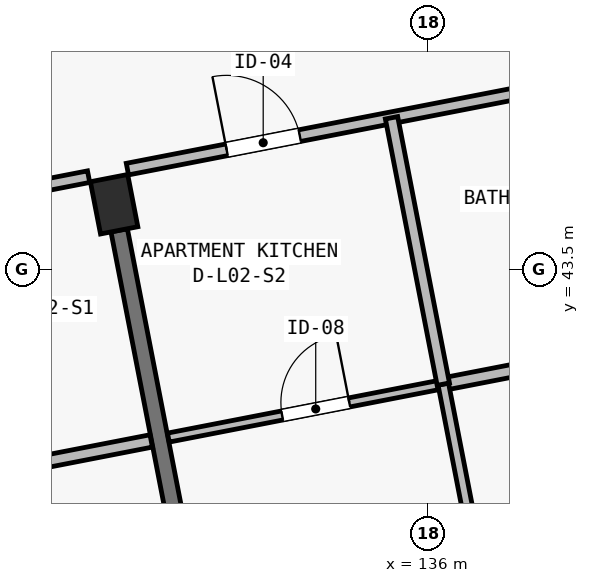
"""IFC4 building model, lengths in metres.
Left out: names, types, materials, properties, quantities, classifications, styles, units other than length and angle.
Written with IfcOpenShell. Run it as: python <this file> out.ifc"""

import sys

from ifc_helpers import new_model, si_unit, direction, frame, frame_2d, origin, origin_2d, place, context, subcontext, project, spatial, rectangle, extrude, element, fill, save


model = new_model("IFC4")
c1 = context("Model", 3, precision=1e-05, world=origin(), true_north=direction((0.0, 1.0)))
c2 = subcontext(c1, "Body", "Model", "MODEL_VIEW")
j1 = project(units=[si_unit("LENGTHUNIT", "METRE"), si_unit("PLANEANGLEUNIT", "RADIAN")], contexts=[c1])
p1 = place(None, origin())
s1 = spatial("IfcSite", under=j1, at=p1, CompositionType="ELEMENT")
p2 = place(p1, origin())
s2 = spatial("IfcBuilding", under=s1, at=p2, CompositionType="ELEMENT")
p3 = place(p2, frame((0.0, 0.0, 8.4)))
s3 = spatial("IfcBuildingStorey", under=s2, at=p3, CompositionType="ELEMENT", Elevation=8.4)
p4 = place(p3, frame((131.871, 44.361, 0.0), z_axis=(0.0, 0.0, 1.0), x_axis=(0.981627183448, 0.190808995377, 0.0)))
e1 = element("IfcColumn", 1, at=p4, inside=s3, PredefinedType="COLUMN", context=c2, shape_type="SweptSolid", body=[
    extrude(rectangle(XDim=0.5, YDim=0.7, at=origin_2d()), origin(), (0.0, 0.0, 1.0), 3.25),
])
p5 = place(p3, frame((133.254, 37.244, 0.0), z_axis=(0.0, 0.0, 1.0), x_axis=(-0.190819465253, 0.981625148252, 0.0)))
e2 = element("IfcWall", 2, at=p5, inside=s3, PredefinedType="SHEAR", context=c2, shape_type="SweptSolid", body=[
    extrude(rectangle(XDim=6.9, YDim=0.22, at=frame_2d((3.45, 0.0))), origin(), (0.0, 0.0, 1.0), 2.5),
])
p6 = place(p3, frame((124.585, 43.372, 0.0), z_axis=(0.0, 0.0, 1.0), x_axis=(0.9816234647, 0.190828125677, 0.0)))
e3 = element("IfcWall", 3, at=p6, inside=s3, PredefinedType="PARTITIONING", context=c2, shape_type="SweptSolid", body=[
    extrude(rectangle(XDim=7.08, YDim=0.155, at=frame_2d((3.54, 0.0))), origin(), (0.0, 0.0, 1.0), 2.97),
])
p7 = place(p6, frame((1.33, 0.0, 0.0)))
e4 = element("IfcOpeningElement", 4, at=p7, cuts=e3, PredefinedType="OPENING", context=c2, shape_type="SweptSolid", body=[
    extrude(rectangle(XDim=1.02, YDim=2.2, at=frame_2d((0.51, 1.1))), frame((0.0, 0.093, 0.0), z_axis=(0.0, -1.0, 0.0), x_axis=(1.0, 0.0, 0.0)), (0.0, 0.0, 1.0), 0.185),
])
p8 = place(p3, frame((128.741, 40.543, 0.0), z_axis=(0.0, 0.0, 1.0), x_axis=(0.981626422232, 0.190812911449, 0.0)))
e5 = element("IfcWall", 5, at=p8, inside=s3, PredefinedType="PLUMBINGWALL", context=c2, shape_type="SweptSolid", body=[
    extrude(rectangle(XDim=3.685, YDim=0.165, at=frame_2d((1.842, 0.0))), origin(), (0.0, 0.0, 1.0), 2.97),
])
p9 = place(p8, frame((1.3, 0.0, 0.0)))
e6 = element("IfcOpeningElement", 6, at=p9, cuts=e5, PredefinedType="OPENING", context=c2, shape_type="SweptSolid", body=[
    extrude(rectangle(XDim=0.82, YDim=2.08, at=frame_2d((0.41, 1.04))), frame((0.0, 0.097, 0.0), z_axis=(0.0, -1.0, 0.0), x_axis=(1.0, 0.0, 0.0)), (0.0, 0.0, 1.0), 0.195),
])
p10 = place(p3, frame((132.046, 44.823, 0.0), z_axis=(0.0, 0.0, 1.0), x_axis=(0.9816234647, 0.190828125677, 0.0)))
e7 = element("IfcWall", 7, at=p10, inside=s3, PredefinedType="PARTITIONING", context=c2, shape_type="SweptSolid", body=[
    extrude(rectangle(XDim=7.08, YDim=0.155, at=frame_2d((3.54, 0.0))), origin(), (0.0, 0.0, 1.0), 2.97),
])
p11 = place(p10, frame((1.33, 0.0, 0.0)))
e8 = element("IfcOpeningElement", 8, at=p11, cuts=e7, PredefinedType="OPENING", context=c2, shape_type="SweptSolid", body=[
    extrude(rectangle(XDim=0.98, YDim=2.15, at=frame_2d((0.49, 1.075))), frame((0.0, 0.093, 0.0), z_axis=(0.0, -1.0, 0.0), x_axis=(1.0, 0.0, 0.0)), (0.0, 0.0, 1.0), 0.185),
])
p12 = place(p3, frame((132.584, 41.291, 0.0), z_axis=(0.0, 0.0, 1.0), x_axis=(0.981628834294, 0.190800502313, 0.0)))
e9 = element("IfcWall", 9, at=p12, inside=s3, PredefinedType="PARTITIONING", context=c2, shape_type="SweptSolid", body=[
    extrude(rectangle(XDim=3.685, YDim=0.12, at=frame_2d((1.843, 0.0))), origin(), (0.0, 0.0, 1.0), 2.97),
])
p13 = place(p12, frame((1.525, 0.0, 0.0)))
e10 = element("IfcOpeningElement", 10, at=p13, cuts=e9, PredefinedType="OPENING", context=c2, shape_type="SweptSolid", body=[
    extrude(rectangle(XDim=0.9, YDim=2.1, at=frame_2d((0.45, 1.05))), frame((0.0, 0.075, 0.0), z_axis=(0.0, -1.0, 0.0), x_axis=(1.0, 0.0, 0.0)), (0.0, 0.0, 1.0), 0.15),
])
p14 = place(p3, frame((136.202, 41.994, 0.0), z_axis=(0.0, 0.0, 1.0), x_axis=(0.981626422232, 0.190812911449, 0.0)))
e11 = element("IfcWall", 11, at=p14, inside=s3, PredefinedType="PLUMBINGWALL", context=c2, shape_type="SweptSolid", body=[
    extrude(rectangle(XDim=3.685, YDim=0.165, at=frame_2d((1.842, 0.0))), origin(), (0.0, 0.0, 1.0), 2.97),
])
p15 = place(p14, frame((1.3, 0.0, 0.0)))
e12 = element("IfcOpeningElement", 12, at=p15, cuts=e11, PredefinedType="OPENING", context=c2, shape_type="SweptSolid", body=[
    extrude(rectangle(XDim=0.82, YDim=2.08, at=frame_2d((0.41, 1.04))), frame((0.0, 0.097, 0.0), z_axis=(0.0, -1.0, 0.0), x_axis=(1.0, 0.0, 0.0)), (0.0, 0.0, 1.0), 0.195),
])
p16 = place(p3, frame((137.125, 37.242, 0.0), z_axis=(0.0, 0.0, 1.0), x_axis=(-0.190768400775, 0.981635073368, 0.0)))
e13 = element("IfcWall", 13, at=p16, inside=s3, PredefinedType="PARTITIONING", context=c2, shape_type="SweptSolid", body=[
    extrude(rectangle(XDim=4.84, YDim=0.14, at=frame_2d((2.42, 0.0))), origin(), (0.0, 0.0, 1.0), 2.97),
])
p17 = place(p16, frame((1.35, 0.0, 0.0)))
e14 = element("IfcOpeningElement", 14, at=p17, cuts=e13, PredefinedType="OPENING", context=c2, shape_type="SweptSolid", body=[
    extrude(rectangle(XDim=0.9, YDim=2.1, at=frame_2d((0.45, 1.05))), frame((0.0, 0.085, 0.0), z_axis=(0.0, -1.0, 0.0), x_axis=(1.0, 0.0, 0.0)), (0.0, 0.0, 1.0), 0.17),
])
p18 = place(p3, frame((136.202, 41.994, 0.0), z_axis=(0.0, 0.0, 1.0), x_axis=(-0.190865998276, 0.981616101489, 0.0)))
e15 = element("IfcWall", 15, at=p18, inside=s3, PredefinedType="PLUMBINGWALL", context=c2, shape_type="SweptSolid", body=[
    extrude(rectangle(XDim=3.57, YDim=0.165, at=frame_2d((1.785, 0.0))), origin(), (0.0, 0.0, 1.0), 2.97),
])
p19 = place(p11, origin())
e16 = element("IfcDoor", 16, at=p19, inside=s3, OperationType="SINGLE_SWING_LEFT", PredefinedType="DOOR", context=c2, shape_type="SweptSolid", body=[
    extrude(rectangle(XDim=0.98, YDim=2.15, at=frame_2d((0.49, 1.075))), frame((0.0, 0.025, 0.0), z_axis=(0.0, -1.0, 0.0), x_axis=(1.0, 0.0, 0.0)), (0.0, 0.0, 1.0), 0.05),
])
fill(e8, e16)
p20 = place(p13, origin())
e17 = element("IfcDoor", 17, at=p20, inside=s3, OperationType="SINGLE_SWING_RIGHT", PredefinedType="DOOR", context=c2, shape_type="SweptSolid", body=[
    extrude(rectangle(XDim=0.9, YDim=2.1, at=frame_2d((0.45, 1.05))), frame((0.0, 0.025, 0.0), z_axis=(0.0, -1.0, 0.0), x_axis=(1.0, 0.0, 0.0)), (0.0, 0.0, 1.0), 0.05),
])
fill(e10, e17)
save(model, sys.argv[1])
